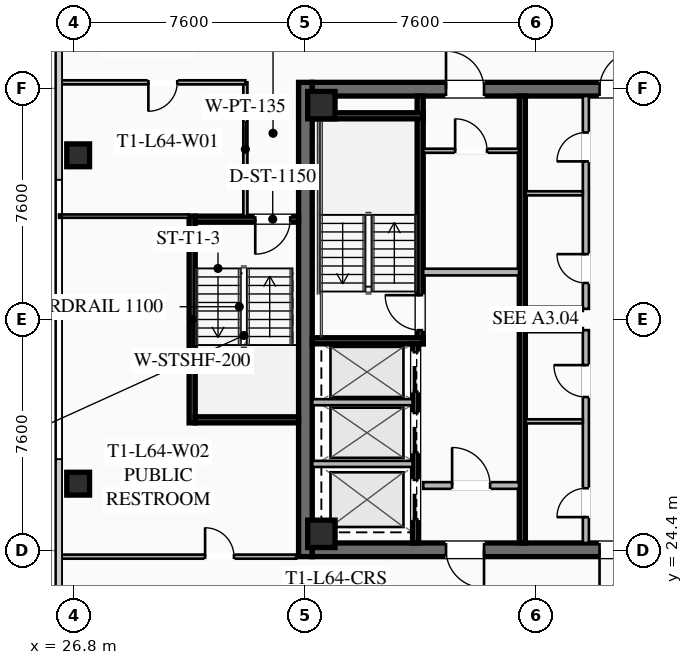
"""IFC4 building model, lengths in metres.
Left out: names, types, materials, properties, quantities, classifications, styles, units other than length and angle.
Written with IfcOpenShell. Run it as: python <this file> out.ifc"""

import sys

from ifc_helpers import new_model, si_unit, direction, frame, frame_2d, origin, origin_2d, place, context, subcontext, project, spatial, rectangle, hollow_rectangle, extrude, element, fill, save


model = new_model("IFC4")
c1 = context("Model", 3, precision=1e-05, world=origin(), true_north=direction((0.0, 1.0)))
c2 = subcontext(c1, "Body", "Model", "MODEL_VIEW")
j1 = project(units=[si_unit("LENGTHUNIT", "METRE"), si_unit("PLANEANGLEUNIT", "RADIAN")], contexts=[c1])
p1 = place(None, origin())
s1 = spatial("IfcSite", under=j1, at=p1, CompositionType="ELEMENT")
p2 = place(p1, origin())
s2 = spatial("IfcBuilding", under=s1, at=p2, CompositionType="ELEMENT")
p3 = place(p2, frame((0.0, 0.0, 236.15)))
s3 = spatial("IfcBuildingStorey", under=s2, at=p3, CompositionType="ELEMENT", Elevation=236.15)
p4 = place(p3, frame((34.425, 24.2, 0.0), z_axis=(0.0, 0.0, 1.0), x_axis=(0.0, 1.0, 0.0)))
e1 = element("IfcWall", 1, at=p4, inside=s3, PredefinedType="SHEAR", context=c2, shape_type="SweptSolid", body=[
    extrude(rectangle(XDim=15.6, YDim=0.45, at=frame_2d((7.8, 0.0))), origin(), (0.0, 0.0, 1.0), 3.55),
])
p5 = place(p3, frame((49.35, 24.425, 0.0), z_axis=(0.0, 0.0, 1.0), x_axis=(-1.0, 0.0, 0.0)))
e2 = element("IfcWall", 2, at=p5, inside=s3, PredefinedType="SHEAR", context=c2, shape_type="SweptSolid", body=[
    extrude(rectangle(XDim=14.7, YDim=0.45, at=frame_2d((7.35, 0.0))), origin(), (0.0, 0.0, 1.0), 3.55),
])
p6 = place(p5, frame((9.05, 0.0, 0.0)))
e3 = element("IfcOpeningElement", 3, at=p6, cuts=e2, PredefinedType="OPENING", context=c2, shape_type="SweptSolid", body=[
    extrude(rectangle(XDim=1.25, YDim=2.25, at=frame_2d((0.625, 1.125))), frame((0.0, 0.235, 0.0), z_axis=(0.0, -1.0, 0.0), x_axis=(1.0, 0.0, 0.0)), (0.0, 0.0, 1.0), 0.47),
])
p7 = place(p5, frame((4.0, 0.0, 0.0)))
e4 = element("IfcOpeningElement", 4, at=p7, cuts=e2, PredefinedType="OPENING", context=c2, shape_type="SweptSolid", body=[
    extrude(rectangle(XDim=1.25, YDim=2.25, at=frame_2d((0.625, 1.125))), frame((0.0, 0.235, 0.0), z_axis=(0.0, -1.0, 0.0), x_axis=(1.0, 0.0, 0.0)), (0.0, 0.0, 1.0), 0.47),
])
p8 = place(p3, frame((34.65, 39.575, 0.0), z_axis=(0.0, 0.0, 1.0), x_axis=(1.0, 0.0, 0.0)))
e5 = element("IfcWall", 5, at=p8, inside=s3, PredefinedType="SHEAR", context=c2, shape_type="SweptSolid", body=[
    extrude(rectangle(XDim=14.7, YDim=0.45, at=frame_2d((7.35, 0.0))), origin(), (0.0, 0.0, 1.0), 3.55),
])
p9 = place(p8, frame((4.4, 0.0, 0.0)))
e6 = element("IfcOpeningElement", 6, at=p9, cuts=e5, PredefinedType="OPENING", context=c2, shape_type="SweptSolid", body=[
    extrude(rectangle(XDim=1.25, YDim=2.25, at=frame_2d((0.625, 1.125))), frame((0.0, 0.235, 0.0), z_axis=(0.0, -1.0, 0.0), x_axis=(1.0, 0.0, 0.0)), (0.0, 0.0, 1.0), 0.47),
])
p10 = place(p8, frame((9.45, 0.0, 0.0)))
e7 = element("IfcOpeningElement", 7, at=p10, cuts=e5, PredefinedType="OPENING", context=c2, shape_type="SweptSolid", body=[
    extrude(rectangle(XDim=1.25, YDim=2.25, at=frame_2d((0.625, 1.125))), frame((0.0, 0.235, 0.0), z_axis=(0.0, -1.0, 0.0), x_axis=(1.0, 0.0, 0.0)), (0.0, 0.0, 1.0), 0.47),
])
for number, where, z_axis, x_axis in (
    (8, (34.95, 24.95, 0.0), (0.0, 0.0, 1.0), (1.0, 0.0, 0.0)),
    (9, (34.95, 39.05, 0.0), (0.0, 0.0, 1.0), (1.0, 0.0, 0.0)),
):
    element("IfcColumn", number, at=place(p3, frame(where, z_axis=z_axis, x_axis=x_axis)), inside=s3, PredefinedType="COLUMN", context=c2, shape_type="SweptSolid", body=[
        extrude(hollow_rectangle(XDim=0.9, YDim=0.9, WallThickness=0.04, at=origin_2d()), origin(), (0.0, 0.0, 1.0), 3.37),
    ])
for number, where, z_axis, x_axis in (
    (10, (26.95, 37.4, 0.0), (0.0, 0.0, 1.0), (1.0, 0.0, 0.0)),
    (11, (26.95, 26.6, 0.0), (0.0, 0.0, 1.0), (1.0, 0.0, 0.0)),
):
    element("IfcColumn", number, at=place(p3, frame(where, z_axis=z_axis, x_axis=x_axis)), inside=s3, PredefinedType="COLUMN", context=c2, shape_type="SweptSolid", body=[
        extrude(hollow_rectangle(XDim=0.75, YDim=0.75, WallThickness=0.032, at=origin_2d()), origin(), (0.0, 0.0, 1.0), 3.37),
    ])
p11 = place(p3, frame((38.2, 31.2, 0.0), z_axis=(0.0, 0.0, 1.0), x_axis=(0.0, 1.0, 0.0)))
e12 = element("IfcWall", 12, at=p11, inside=s3, PredefinedType="SHEAR", context=c2, shape_type="SweptSolid", body=[
    extrude(rectangle(XDim=8.15, YDim=0.2, at=frame_2d((4.075, 0.0))), origin(), (0.0, 0.0, 1.0), 3.37),
])
p12 = place(p11, frame((0.45, 0.0, 0.0)))
e13 = element("IfcOpeningElement", 13, at=p12, cuts=e12, PredefinedType="OPENING", context=c2, shape_type="SweptSolid", body=[
    extrude(rectangle(XDim=1.15, YDim=2.2, at=frame_2d((0.575, 1.1))), frame((0.0, 0.11, 0.0), z_axis=(0.0, -1.0, 0.0), x_axis=(1.0, 0.0, 0.0)), (0.0, 0.0, 1.0), 0.22),
])
for number, where, z_axis, x_axis in (
    (14, (34.65, 31.3, 0.0), (0.0, 0.0, 1.0), (1.0, 0.0, 0.0)),
    (15, (34.65, 38.7, 0.0), (0.0, 0.0, 1.0), (1.0, 0.0, 0.0)),
):
    element("IfcWall", number, at=place(p3, frame(where, z_axis=z_axis, x_axis=x_axis)), inside=s3, PredefinedType="SHEAR", context=c2, shape_type="SweptSolid", body=[
        extrude(rectangle(XDim=3.65, YDim=0.2, at=frame_2d((1.825, 0.0))), origin(), (0.0, 0.0, 1.0), 3.37),
    ])
p13 = place(p3, frame((41.56, 24.65, 0.0), z_axis=(0.0, 0.0, 1.0), x_axis=(0.0, 1.0, 0.0)))
e16 = element("IfcWall", 16, at=p13, inside=s3, PredefinedType="SHEAR", context=c2, shape_type="SweptSolid", body=[
    extrude(rectangle(XDim=14.7, YDim=0.2, at=frame_2d((7.35, 0.0))), origin(), (0.0, 0.0, 1.0), 3.37),
])
p14 = place(p3, frame((38.3, 33.56, 0.0), z_axis=(0.0, 0.0, 1.0), x_axis=(1.0, 0.0, 0.0)))
e17 = element("IfcWall", 17, at=p14, inside=s3, PredefinedType="SOLIDWALL", context=c2, shape_type="SweptSolid", body=[
    extrude(rectangle(XDim=3.15, YDim=0.22, at=frame_2d((1.575, 0.0))), origin(), (0.0, 0.0, 1.0), 2.723),
])
p15 = place(p3, frame((38.3, 26.54, 0.0), z_axis=(0.0, 0.0, 1.0), x_axis=(1.0, 0.0, 0.0)))
e18 = element("IfcWall", 18, at=p15, inside=s3, PredefinedType="SOLIDWALL", context=c2, shape_type="SweptSolid", body=[
    extrude(rectangle(XDim=3.15, YDim=0.22, at=frame_2d((1.575, 0.0))), origin(), (0.0, 0.0, 1.0), 2.723),
])
p16 = place(p15, frame((0.95, 0.0, 0.0)))
e19 = element("IfcOpeningElement", 19, at=p16, cuts=e18, PredefinedType="OPENING", context=c2, shape_type="SweptSolid", body=[
    extrude(rectangle(XDim=1.25, YDim=2.25, at=frame_2d((0.625, 1.125))), frame((0.0, 0.12, 0.0), z_axis=(0.0, -1.0, 0.0), x_axis=(1.0, 0.0, 0.0)), (0.0, 0.0, 1.0), 0.24),
])
p17 = place(p3, frame((38.05, 24.65, 0.0), z_axis=(0.0, 0.0, 1.0), x_axis=(0.0, 1.0, 0.0)))
e20 = element("IfcWall", 20, at=p17, inside=s3, PredefinedType="SHEAR", context=c2, shape_type="SweptSolid", body=[
    extrude(rectangle(XDim=6.55, YDim=0.2, at=frame_2d((3.275, 0.0))), origin(), (0.0, 0.0, 1.0), 3.37),
])
p18 = place(p17, frame((4.975, 0.0, 0.0)))
e21 = element("IfcOpeningElement", 21, at=p18, cuts=e20, PredefinedType="OPENING", context=c2, shape_type="SweptSolid", body=[
    extrude(rectangle(XDim=1.3, YDim=2.25, at=frame_2d((0.65, 1.125))), frame((0.0, 0.11, 0.0), z_axis=(0.0, -1.0, 0.0), x_axis=(1.0, 0.0, 0.0)), (0.0, 0.0, 1.0), 0.22),
])
p19 = place(p17, frame((2.975, 0.0, 0.0)))
e22 = element("IfcOpeningElement", 22, at=p19, cuts=e20, PredefinedType="OPENING", context=c2, shape_type="SweptSolid", body=[
    extrude(rectangle(XDim=1.3, YDim=2.25, at=frame_2d((0.65, 1.125))), frame((0.0, 0.11, 0.0), z_axis=(0.0, -1.0, 0.0), x_axis=(1.0, 0.0, 0.0)), (0.0, 0.0, 1.0), 0.22),
])
p20 = place(p17, frame((0.775, 0.0, 0.0)))
e23 = element("IfcOpeningElement", 23, at=p20, cuts=e20, PredefinedType="OPENING", context=c2, shape_type="SweptSolid", body=[
    extrude(rectangle(XDim=1.3, YDim=2.25, at=frame_2d((0.65, 1.125))), frame((0.0, 0.11, 0.0), z_axis=(0.0, -1.0, 0.0), x_axis=(1.0, 0.0, 0.0)), (0.0, 0.0, 1.0), 0.22),
])
for number, where, z_axis, x_axis in (
    (24, (34.65, 27.25, 0.0), (0.0, 0.0, 1.0), (1.0, 0.0, 0.0)),
    (25, (34.65, 29.28, 0.0), (0.0, 0.0, 1.0), (1.0, 0.0, 0.0)),
):
    element("IfcWall", number, at=place(p3, frame(where, z_axis=z_axis, x_axis=x_axis)), inside=s3, PredefinedType="SOLIDWALL", context=c2, shape_type="SweptSolid", body=[
        extrude(rectangle(XDim=3.3, YDim=0.2, at=frame_2d((1.65, 0.0))), origin(), (0.0, 0.0, 1.0), 3.37),
    ])
p21 = place(p3, frame((38.3, 37.55, 0.0), z_axis=(0.0, 0.0, 1.0), x_axis=(1.0, 0.0, 0.0)))
e26 = element("IfcWall", 26, at=p21, inside=s3, PredefinedType="PARTITIONING", context=c2, shape_type="SweptSolid", body=[
    extrude(rectangle(XDim=3.15, YDim=0.135, at=frame_2d((1.575, 0.0))), origin(), (0.0, 0.0, 1.0), 2.723),
])
p22 = place(p21, frame((1.05, 0.0, 0.0)))
e27 = element("IfcOpeningElement", 27, at=p22, cuts=e26, PredefinedType="OPENING", context=c2, shape_type="SweptSolid", body=[
    extrude(rectangle(XDim=1.05, YDim=2.2, at=frame_2d((0.525, 1.1))), frame((0.0, 0.077, 0.0), z_axis=(0.0, -1.0, 0.0), x_axis=(1.0, 0.0, 0.0)), (0.0, 0.0, 1.0), 0.155),
])
p23 = place(p3, frame((43.65, 24.65, 0.0), z_axis=(0.0, 0.0, 1.0), x_axis=(0.0, 1.0, 0.0)))
e28 = element("IfcWall", 28, at=p23, inside=s3, PredefinedType="SOLIDWALL", context=c2, shape_type="SweptSolid", body=[
    extrude(rectangle(XDim=7.0, YDim=0.2, at=frame_2d((3.5, 0.0))), origin(), (0.0, 0.0, 1.0), 2.723),
])
p24 = place(p23, frame((0.85, 0.0, 0.0)))
e29 = element("IfcOpeningElement", 29, at=p24, cuts=e28, PredefinedType="OPENING", context=c2, shape_type="SweptSolid", body=[
    extrude(rectangle(XDim=0.95, YDim=2.05, at=frame_2d((0.475, 1.025))), frame((0.0, 0.11, 0.0), z_axis=(0.0, -1.0, 0.0), x_axis=(1.0, 0.0, 0.0)), (0.0, 0.0, 1.0), 0.22),
])
p25 = place(p23, frame((4.8, 0.0, 0.0)))
e30 = element("IfcOpeningElement", 30, at=p25, cuts=e28, PredefinedType="OPENING", context=c2, shape_type="SweptSolid", body=[
    extrude(rectangle(XDim=1.05, YDim=2.2, at=frame_2d((0.525, 1.1))), frame((0.0, 0.11, 0.0), z_axis=(0.0, -1.0, 0.0), x_axis=(1.0, 0.0, 0.0)), (0.0, 0.0, 1.0), 0.22),
])
for number, where, z_axis, x_axis in (
    (31, (41.67, 31.65, 0.0), (0.0, 0.0, 1.0), (1.0, 0.0, 0.0)),
    (32, (41.67, 28.65, 0.0), (0.0, 0.0, 1.0), (1.0, 0.0, 0.0)),
):
    element("IfcWall", number, at=place(p3, frame(where, z_axis=z_axis, x_axis=x_axis)), inside=s3, PredefinedType="PARTITIONING", context=c2, shape_type="SweptSolid", body=[
        extrude(rectangle(XDim=1.88, YDim=0.135, at=frame_2d((0.94, 0.0))), origin(), (0.0, 0.0, 1.0), 2.723),
    ])
p26 = place(p3, frame((43.65, 32.35, 0.0), z_axis=(0.0, 0.0, 1.0), x_axis=(0.0, 1.0, 0.0)))
e33 = element("IfcWall", 33, at=p26, inside=s3, PredefinedType="SOLIDWALL", context=c2, shape_type="SweptSolid", body=[
    extrude(rectangle(XDim=7.0, YDim=0.2, at=frame_2d((3.5, 0.0))), origin(), (0.0, 0.0, 1.0), 2.723),
])
p27 = place(p26, frame((0.85, 0.0, 0.0)))
e34 = element("IfcOpeningElement", 34, at=p27, cuts=e33, PredefinedType="OPENING", context=c2, shape_type="SweptSolid", body=[
    extrude(rectangle(XDim=0.95, YDim=2.05, at=frame_2d((0.475, 1.025))), frame((0.0, 0.11, 0.0), z_axis=(0.0, -1.0, 0.0), x_axis=(1.0, 0.0, 0.0)), (0.0, 0.0, 1.0), 0.22),
])
p28 = place(p26, frame((4.85, 0.0, 0.0)))
e35 = element("IfcOpeningElement", 35, at=p28, cuts=e33, PredefinedType="OPENING", context=c2, shape_type="SweptSolid", body=[
    extrude(rectangle(XDim=0.95, YDim=2.05, at=frame_2d((0.475, 1.025))), frame((0.0, 0.11, 0.0), z_axis=(0.0, -1.0, 0.0), x_axis=(1.0, 0.0, 0.0)), (0.0, 0.0, 1.0), 0.22),
])
for number, where, z_axis, x_axis in (
    (36, (41.67, 32.35, 0.0), (0.0, 0.0, 1.0), (1.0, 0.0, 0.0)),
    (37, (41.67, 36.15, 0.0), (0.0, 0.0, 1.0), (1.0, 0.0, 0.0)),
):
    element("IfcWall", number, at=place(p3, frame(where, z_axis=z_axis, x_axis=x_axis)), inside=s3, PredefinedType="PARTITIONING", context=c2, shape_type="SweptSolid", body=[
        extrude(rectangle(XDim=1.88, YDim=0.135, at=frame_2d((0.94, 0.0))), origin(), (0.0, 0.0, 1.0), 2.723),
    ])
p29 = place(p3, frame((30.7, 28.6, 0.0), z_axis=(0.0, 0.0, 1.0), x_axis=(0.0, 1.0, 0.0)))
e38 = element("IfcWall", 38, at=p29, inside=s3, PredefinedType="SHEAR", context=c2, shape_type="SweptSolid", body=[
    extrude(rectangle(XDim=6.8, YDim=0.2, at=frame_2d((3.4, 0.0))), origin(), (0.0, 0.0, 1.0), 3.37),
])
p30 = place(p3, frame((34.2, 35.3, 0.0), z_axis=(0.0, 0.0, 1.0), x_axis=(-1.0, 0.0, 0.0)))
e39 = element("IfcWall", 39, at=p30, inside=s3, PredefinedType="SHEAR", context=c2, shape_type="SweptSolid", body=[
    extrude(rectangle(XDim=3.4, YDim=0.2, at=frame_2d((1.7, 0.0))), origin(), (0.0, 0.0, 1.0), 3.37),
])
p31 = place(p30, frame((0.275, 0.0, 0.0)))
e40 = element("IfcOpeningElement", 40, at=p31, cuts=e39, PredefinedType="OPENING", context=c2, shape_type="SweptSolid", body=[
    extrude(rectangle(XDim=1.15, YDim=2.2, at=frame_2d((0.575, 1.1))), frame((0.0, 0.11, 0.0), z_axis=(0.0, -1.0, 0.0), x_axis=(1.0, 0.0, 0.0)), (0.0, 0.0, 1.0), 0.22),
])
p32 = place(p3, frame((30.8, 28.7, 0.0), z_axis=(0.0, 0.0, 1.0), x_axis=(1.0, 0.0, 0.0)))
e41 = element("IfcWall", 41, at=p32, inside=s3, PredefinedType="SHEAR", context=c2, shape_type="SweptSolid", body=[
    extrude(rectangle(XDim=3.4, YDim=0.2, at=frame_2d((1.7, 0.0))), origin(), (0.0, 0.0, 1.0), 3.37),
])
p33 = place(p3, frame((32.45, 35.4, 0.0), z_axis=(0.0, 0.0, 1.0), x_axis=(0.0, 1.0, 0.0)))
e42 = element("IfcWall", 42, at=p33, inside=s3, PredefinedType="PARTITIONING", context=c2, shape_type="SweptSolid", body=[
    extrude(rectangle(XDim=4.4, YDim=0.135, at=frame_2d((2.2, 0.0))), origin(), (0.0, 0.0, 1.0), 2.723),
])
p34 = place(p3, frame((32.45, 39.8, 0.0), z_axis=(0.0, 0.0, 1.0), x_axis=(-1.0, 0.0, 0.0)))
e43 = element("IfcWall", 43, at=p34, inside=s3, PredefinedType="PARTITIONING", context=c2, shape_type="SweptSolid", body=[
    extrude(rectangle(XDim=6.13, YDim=0.135, at=frame_2d((3.065, 0.0))), origin(), (0.0, 0.0, 1.0), 2.723),
])
p35 = place(p34, frame((2.24, 0.0, 0.0)))
e44 = element("IfcOpeningElement", 44, at=p35, cuts=e43, PredefinedType="OPENING", context=c2, shape_type="SweptSolid", body=[
    extrude(rectangle(XDim=0.95, YDim=2.05, at=frame_2d((0.475, 1.025))), frame((0.0, 0.077, 0.0), z_axis=(0.0, -1.0, 0.0), x_axis=(1.0, 0.0, 0.0)), (0.0, 0.0, 1.0), 0.155),
])
p36 = place(p3, frame((26.32, 24.2, 0.0), z_axis=(0.0, 0.0, 1.0), x_axis=(1.0, 0.0, 0.0)))
e45 = element("IfcWall", 45, at=p36, inside=s3, PredefinedType="PARTITIONING", context=c2, shape_type="SweptSolid", body=[
    extrude(rectangle(XDim=7.8, YDim=0.135, at=frame_2d((3.9, 0.0))), origin(), (0.0, 0.0, 1.0), 2.723),
])
p37 = place(p36, frame((4.805, 0.0, 0.0)))
e46 = element("IfcOpeningElement", 46, at=p37, cuts=e45, PredefinedType="OPENING", context=c2, shape_type="SweptSolid", body=[
    extrude(rectangle(XDim=0.95, YDim=2.05, at=frame_2d((0.475, 1.025))), frame((0.0, 0.077, 0.0), z_axis=(0.0, -1.0, 0.0), x_axis=(1.0, 0.0, 0.0)), (0.0, 0.0, 1.0), 0.155),
])
p38 = place(p3, frame((30.6, 35.4, 0.0), z_axis=(0.0, 0.0, 1.0), x_axis=(-1.0, 0.0, 0.0)))
e47 = element("IfcWall", 47, at=p38, inside=s3, PredefinedType="PARTITIONING", context=c2, shape_type="SweptSolid", body=[
    extrude(rectangle(XDim=4.28, YDim=0.11, at=frame_2d((2.14, 0.0))), origin(), (0.0, 0.0, 1.0), 2.723),
])
p39 = place(p9, origin())
e48 = element("IfcDoor", 48, at=p39, inside=s3, OperationType="SINGLE_SWING_LEFT", PredefinedType="DOOR", context=c2, shape_type="SweptSolid", body=[
    extrude(rectangle(XDim=1.25, YDim=2.25, at=frame_2d((0.625, 1.125))), frame((0.0, 0.025, 0.0), z_axis=(0.0, -1.0, 0.0), x_axis=(1.0, 0.0, 0.0)), (0.0, 0.0, 1.0), 0.05),
])
fill(e6, e48)
p40 = place(p10, origin())
e49 = element("IfcDoor", 49, at=p40, inside=s3, OperationType="SINGLE_SWING_RIGHT", PredefinedType="DOOR", context=c2, shape_type="SweptSolid", body=[
    extrude(rectangle(XDim=1.25, YDim=2.25, at=frame_2d((0.625, 1.125))), frame((0.0, 0.025, 0.0), z_axis=(0.0, -1.0, 0.0), x_axis=(1.0, 0.0, 0.0)), (0.0, 0.0, 1.0), 0.05),
])
fill(e7, e49)
p41 = place(p6, origin())
e50 = element("IfcDoor", 50, at=p41, inside=s3, OperationType="SINGLE_SWING_LEFT", PredefinedType="DOOR", context=c2, shape_type="SweptSolid", body=[
    extrude(rectangle(XDim=1.25, YDim=2.25, at=frame_2d((0.625, 1.125))), frame((0.0, 0.025, 0.0), z_axis=(0.0, -1.0, 0.0), x_axis=(1.0, 0.0, 0.0)), (0.0, 0.0, 1.0), 0.05),
])
fill(e3, e50)
p42 = place(p7, origin())
e51 = element("IfcDoor", 51, at=p42, inside=s3, OperationType="SINGLE_SWING_RIGHT", PredefinedType="DOOR", context=c2, shape_type="SweptSolid", body=[
    extrude(rectangle(XDim=1.25, YDim=2.25, at=frame_2d((0.625, 1.125))), frame((0.0, 0.025, 0.0), z_axis=(0.0, -1.0, 0.0), x_axis=(1.0, 0.0, 0.0)), (0.0, 0.0, 1.0), 0.05),
])
fill(e4, e51)
p43 = place(p12, origin())
e52 = element("IfcDoor", 52, at=p43, inside=s3, OperationType="SINGLE_SWING_RIGHT", PredefinedType="DOOR", context=c2, shape_type="SweptSolid", body=[
    extrude(rectangle(XDim=1.15, YDim=2.2, at=frame_2d((0.575, 1.1))), frame((0.0, 0.025, 0.0), z_axis=(0.0, -1.0, 0.0), x_axis=(1.0, 0.0, 0.0)), (0.0, 0.0, 1.0), 0.05),
])
fill(e13, e52)
p44 = place(p16, origin())
e53 = element("IfcDoor", 53, at=p44, inside=s3, OperationType="SINGLE_SWING_LEFT", PredefinedType="DOOR", context=c2, shape_type="SweptSolid", body=[
    extrude(rectangle(XDim=1.25, YDim=2.25, at=frame_2d((0.625, 1.125))), frame((0.0, 0.025, 0.0), z_axis=(0.0, -1.0, 0.0), x_axis=(1.0, 0.0, 0.0)), (0.0, 0.0, 1.0), 0.05),
])
fill(e19, e53)
p45 = place(p22, origin())
e54 = element("IfcDoor", 54, at=p45, inside=s3, OperationType="SINGLE_SWING_LEFT", PredefinedType="DOOR", context=c2, shape_type="SweptSolid", body=[
    extrude(rectangle(XDim=1.05, YDim=2.2, at=frame_2d((0.525, 1.1))), frame((0.0, 0.025, 0.0), z_axis=(0.0, -1.0, 0.0), x_axis=(1.0, 0.0, 0.0)), (0.0, 0.0, 1.0), 0.05),
])
fill(e27, e54)
p46 = place(p24, origin())
e55 = element("IfcDoor", 55, at=p46, inside=s3, OperationType="SINGLE_SWING_LEFT", PredefinedType="DOOR", context=c2, shape_type="SweptSolid", body=[
    extrude(rectangle(XDim=0.95, YDim=2.05, at=frame_2d((0.475, 1.025))), frame((0.0, 0.025, 0.0), z_axis=(0.0, -1.0, 0.0), x_axis=(1.0, 0.0, 0.0)), (0.0, 0.0, 1.0), 0.05),
])
fill(e29, e55)
p47 = place(p25, origin())
e56 = element("IfcDoor", 56, at=p47, inside=s3, OperationType="SINGLE_SWING_RIGHT", PredefinedType="DOOR", context=c2, shape_type="SweptSolid", body=[
    extrude(rectangle(XDim=1.05, YDim=2.2, at=frame_2d((0.525, 1.1))), frame((0.0, 0.025, 0.0), z_axis=(0.0, -1.0, 0.0), x_axis=(1.0, 0.0, 0.0)), (0.0, 0.0, 1.0), 0.05),
])
fill(e30, e56)
p48 = place(p27, origin())
e57 = element("IfcDoor", 57, at=p48, inside=s3, OperationType="SINGLE_SWING_RIGHT", PredefinedType="DOOR", context=c2, shape_type="SweptSolid", body=[
    extrude(rectangle(XDim=0.95, YDim=2.05, at=frame_2d((0.475, 1.025))), frame((0.0, 0.025, 0.0), z_axis=(0.0, -1.0, 0.0), x_axis=(1.0, 0.0, 0.0)), (0.0, 0.0, 1.0), 0.05),
])
fill(e34, e57)
p49 = place(p28, origin())
e58 = element("IfcDoor", 58, at=p49, inside=s3, OperationType="SINGLE_SWING_LEFT", PredefinedType="DOOR", context=c2, shape_type="SweptSolid", body=[
    extrude(rectangle(XDim=0.95, YDim=2.05, at=frame_2d((0.475, 1.025))), frame((0.0, 0.025, 0.0), z_axis=(0.0, -1.0, 0.0), x_axis=(1.0, 0.0, 0.0)), (0.0, 0.0, 1.0), 0.05),
])
fill(e35, e58)
p50 = place(p31, origin())
e59 = element("IfcDoor", 59, at=p50, inside=s3, OperationType="SINGLE_SWING_RIGHT", PredefinedType="DOOR", context=c2, shape_type="SweptSolid", body=[
    extrude(rectangle(XDim=1.15, YDim=2.2, at=frame_2d((0.575, 1.1))), frame((0.0, 0.025, 0.0), z_axis=(0.0, -1.0, 0.0), x_axis=(1.0, 0.0, 0.0)), (0.0, 0.0, 1.0), 0.05),
])
fill(e40, e59)
p51 = place(p35, origin())
e60 = element("IfcDoor", 60, at=p51, inside=s3, OperationType="SINGLE_SWING_RIGHT", PredefinedType="DOOR", context=c2, shape_type="SweptSolid", body=[
    extrude(rectangle(XDim=0.95, YDim=2.05, at=frame_2d((0.475, 1.025))), frame((0.0, 0.025, 0.0), z_axis=(0.0, -1.0, 0.0), x_axis=(1.0, 0.0, 0.0)), (0.0, 0.0, 1.0), 0.05),
])
fill(e44, e60)
p52 = place(p37, origin())
e61 = element("IfcDoor", 61, at=p52, inside=s3, OperationType="SINGLE_SWING_LEFT", PredefinedType="DOOR", context=c2, shape_type="SweptSolid", body=[
    extrude(rectangle(XDim=0.95, YDim=2.05, at=frame_2d((0.475, 1.025))), frame((0.0, 0.025, 0.0), z_axis=(0.0, -1.0, 0.0), x_axis=(1.0, 0.0, 0.0)), (0.0, 0.0, 1.0), 0.05),
])
fill(e46, e61)
p53 = place(p18, origin())
e62 = element("IfcDoor", 62, at=p53, inside=s3, OperationType="SLIDING_TO_LEFT", PredefinedType="DOOR", context=c2, shape_type="SweptSolid", body=[
    extrude(rectangle(XDim=1.3, YDim=2.25, at=frame_2d((0.65, 1.125))), frame((0.0, 0.025, 0.0), z_axis=(0.0, -1.0, 0.0), x_axis=(1.0, 0.0, 0.0)), (0.0, 0.0, 1.0), 0.05),
])
fill(e21, e62)
p54 = place(p19, origin())
e63 = element("IfcDoor", 63, at=p54, inside=s3, OperationType="SLIDING_TO_LEFT", PredefinedType="DOOR", context=c2, shape_type="SweptSolid", body=[
    extrude(rectangle(XDim=1.3, YDim=2.25, at=frame_2d((0.65, 1.125))), frame((0.0, 0.025, 0.0), z_axis=(0.0, -1.0, 0.0), x_axis=(1.0, 0.0, 0.0)), (0.0, 0.0, 1.0), 0.05),
])
fill(e22, e63)
p55 = place(p20, origin())
e64 = element("IfcDoor", 64, at=p55, inside=s3, OperationType="SLIDING_TO_LEFT", PredefinedType="DOOR", context=c2, shape_type="SweptSolid", body=[
    extrude(rectangle(XDim=1.3, YDim=2.25, at=frame_2d((0.65, 1.125))), frame((0.0, 0.025, 0.0), z_axis=(0.0, -1.0, 0.0), x_axis=(1.0, 0.0, 0.0)), (0.0, 0.0, 1.0), 0.05),
])
fill(e23, e64)
save(model, sys.argv[1])
